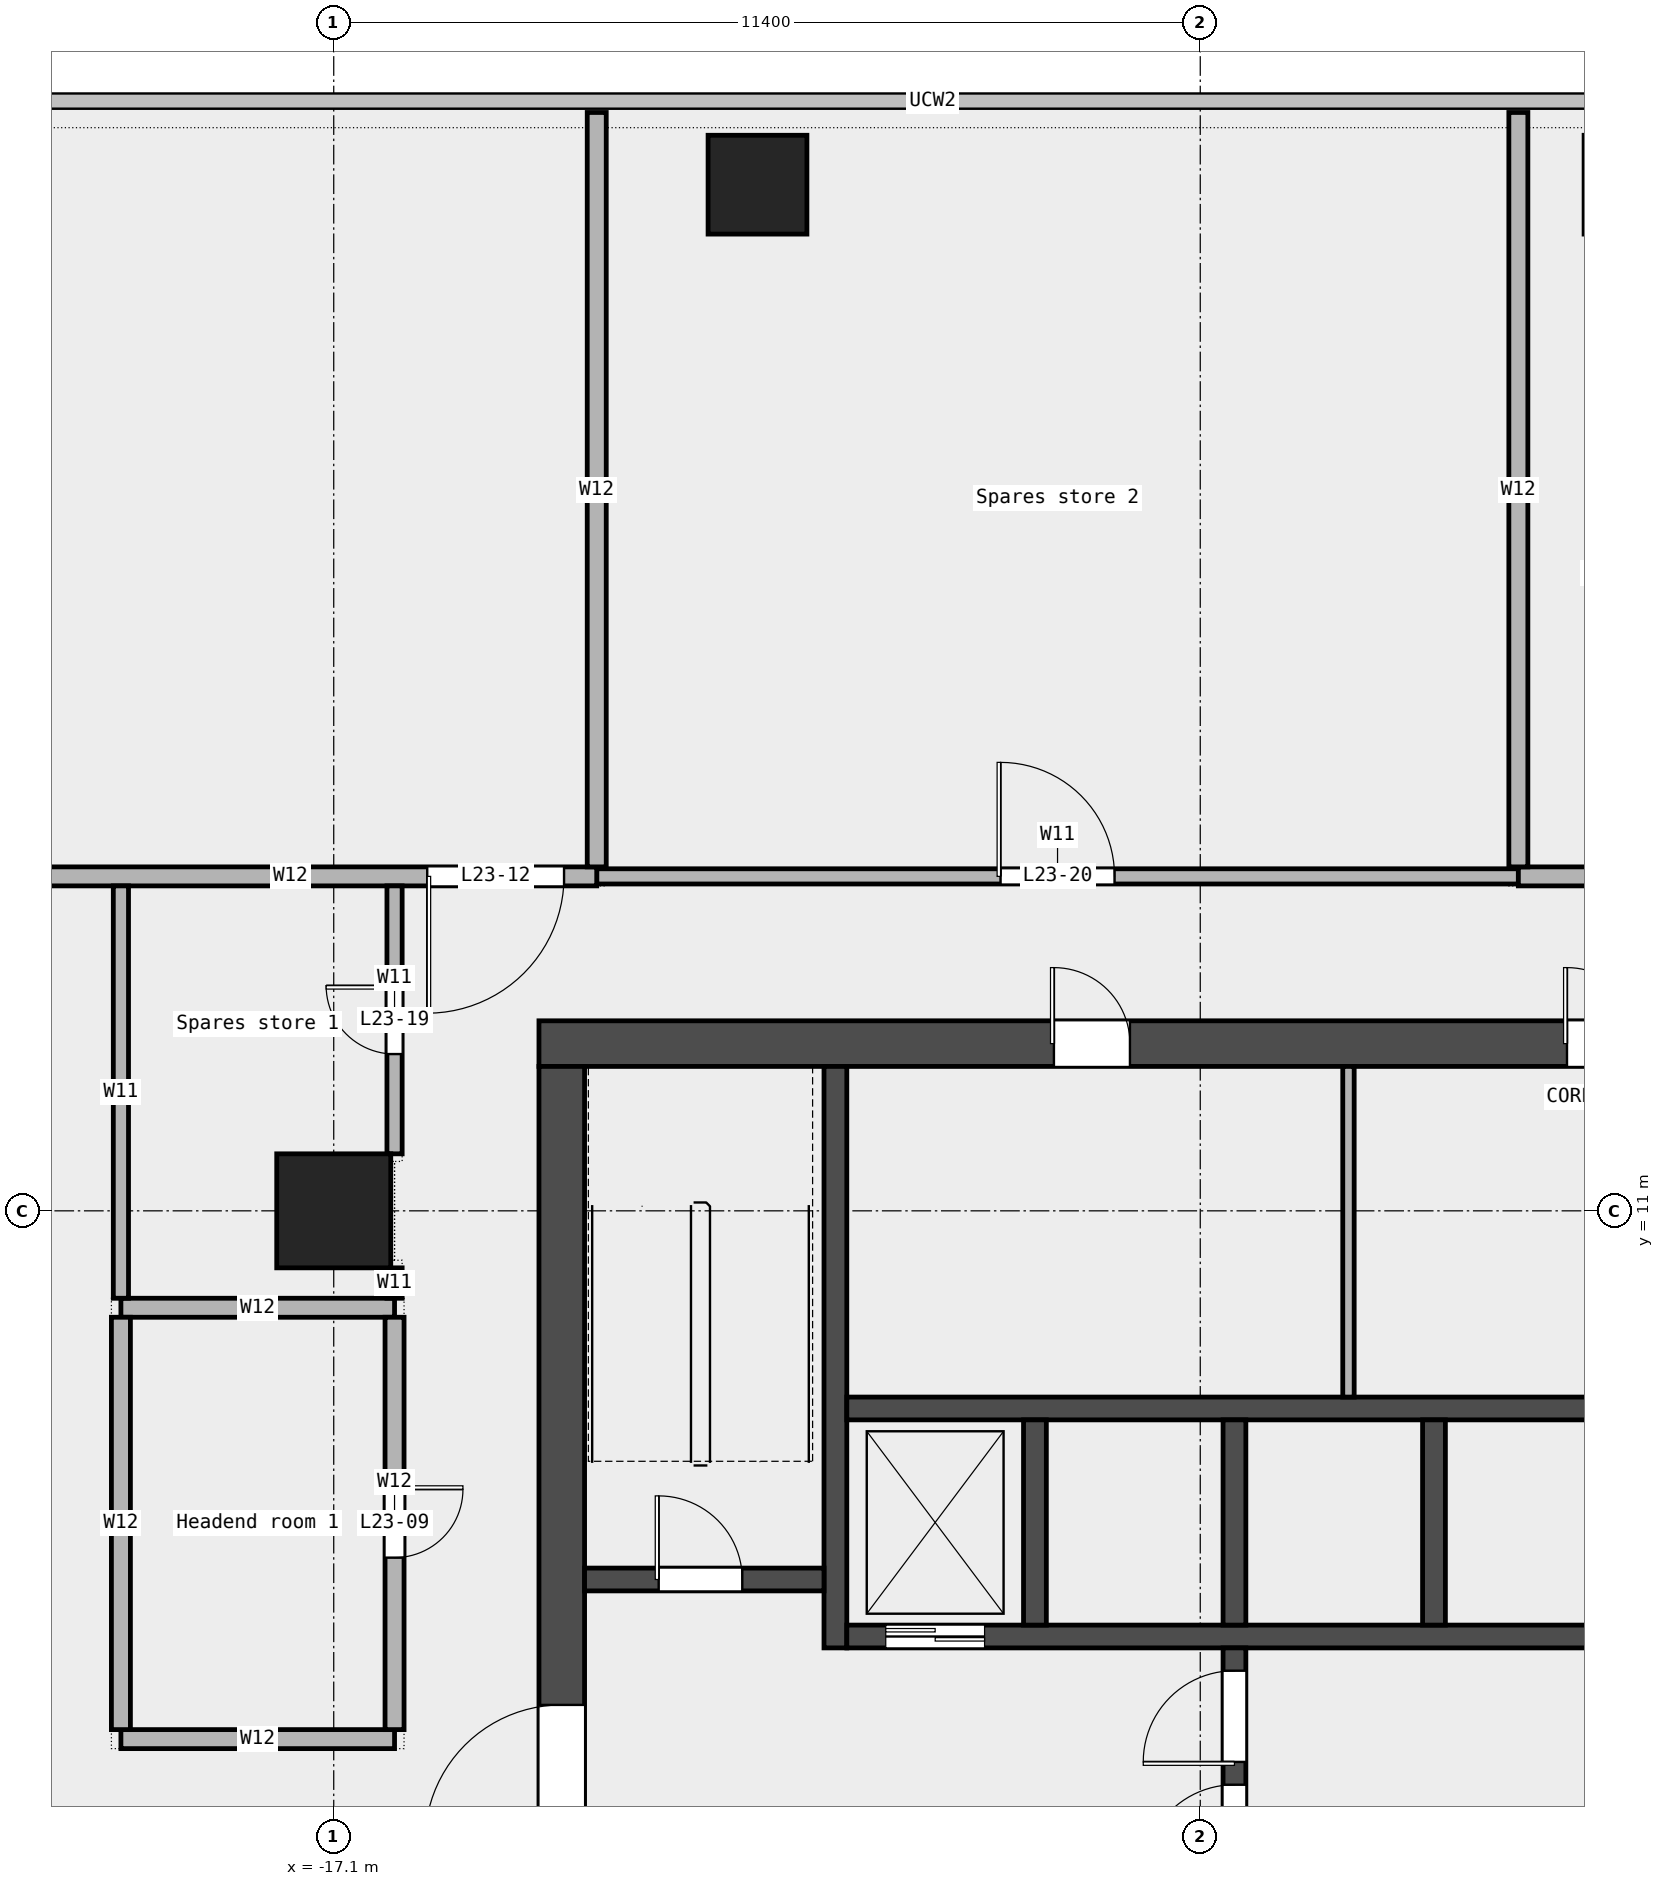
"""IFC4 building model, lengths in metres.
Left out: names, types, materials, properties, quantities, classifications, styles, units other than length and angle.
Written with IfcOpenShell. Run it as: python <this file> out.ifc"""

import sys

from ifc_helpers import new_model, si_unit, direction, frame, frame_2d, origin, origin_2d, place, context, subcontext, project, spatial, rectangle, extrude, element, fill, save


model = new_model("IFC4")
c1 = context("Model", 3, precision=1e-05, world=origin(), true_north=direction((0.0, 1.0)))
c2 = subcontext(c1, "Body", "Model", "MODEL_VIEW")
j1 = project(units=[si_unit("LENGTHUNIT", "METRE"), si_unit("PLANEANGLEUNIT", "RADIAN")], contexts=[c1])
p1 = place(None, origin())
s1 = spatial("IfcSite", under=j1, at=p1, CompositionType="ELEMENT")
p2 = place(p1, origin())
s2 = spatial("IfcBuilding", under=s1, at=p2, CompositionType="ELEMENT")
p3 = place(p2, frame((0.0, 0.0, 117.1)))
s3 = spatial("IfcBuildingStorey", under=s2, at=p3, CompositionType="ELEMENT", Elevation=117.1)
for number, where, z_axis, x_axis in (
    (1, (0.0, 24.5, 0.0), (0.0, 0.0, 1.0), (1.0, 0.0, 0.0)),
    (2, (-11.525, 24.5, 0.0), (0.0, 0.0, 1.0), (1.0, 0.0, 0.0)),
):
    element("IfcColumn", number, at=place(p3, frame(where, z_axis=z_axis, x_axis=x_axis)), inside=s3, PredefinedType="COLUMN", context=c2, shape_type="SweptSolid", body=[
        extrude(rectangle(XDim=1.3, YDim=1.3, at=origin_2d()), origin(), (0.0, 0.0, 1.0), 4.05),
    ])
p4 = place(p3, frame((-17.1, 11.0, 0.0), z_axis=(0.0, 0.0, 1.0), x_axis=(1.0, 0.0, 0.0)))
e3 = element("IfcColumn", 3, at=p4, inside=s3, PredefinedType="COLUMN", context=c2, shape_type="SweptSolid", body=[
    extrude(rectangle(XDim=1.5, YDim=1.5, at=origin_2d()), origin(), (0.0, 0.0, 1.0), 4.05),
])
for number, where, z_axis, x_axis in (
    (4, (-19.9, 4.05, 0.0), (0.0, 0.0, 1.0), (1.0, 0.0, 0.0)),
    (5, (-19.9, 9.725, 0.0), (0.0, 0.0, 1.0), (1.0, 0.0, 0.0)),
):
    element("IfcWall", number, at=place(p3, frame(where, z_axis=z_axis, x_axis=x_axis)), inside=s3, PredefinedType="PARTITIONING", context=c2, shape_type="SweptSolid", body=[
        extrude(rectangle(XDim=3.6, YDim=0.25, at=frame_2d((1.8, 0.0))), origin(), (0.0, 0.0, 1.0), 4.05),
    ])
p5 = place(p3, frame((-13.64, 15.4, 0.0), z_axis=(0.0, 0.0, 1.0), x_axis=(1.0, 0.0, 0.0)))
e6 = element("IfcWall", 6, at=p5, inside=s3, PredefinedType="PARTITIONING", context=c2, shape_type="SweptSolid", body=[
    extrude(rectangle(XDim=12.125, YDim=0.2, at=frame_2d((6.062, 0.0))), origin(), (0.0, 0.0, 1.0), 4.05),
])
p6 = place(p5, frame((5.312, 0.0, 0.0)))
e7 = element("IfcOpeningElement", 7, at=p6, cuts=e6, PredefinedType="OPENING", context=c2, shape_type="SweptSolid", body=[
    extrude(rectangle(XDim=1.5, YDim=2.1, at=frame_2d((0.75, 1.05))), frame((0.0, 0.112, 0.0), z_axis=(0.0, -1.0, 0.0), x_axis=(1.0, 0.0, 0.0)), (0.0, 0.0, 1.0), 0.224),
])
p7 = place(p3, frame((-21.7, 15.4, 0.0), z_axis=(0.0, 0.0, 1.0), x_axis=(1.0, 0.0, 0.0)))
e8 = element("IfcWall", 8, at=p7, inside=s3, PredefinedType="PARTITIONING", context=c2, shape_type="SweptSolid", body=[
    extrude(rectangle(XDim=8.06, YDim=0.25, at=frame_2d((4.03, 0.0))), origin(), (0.0, 0.0, 1.0), 4.05),
])
p8 = place(p7, frame((5.83, 0.0, 0.0)))
e9 = element("IfcOpeningElement", 9, at=p8, cuts=e8, PredefinedType="OPENING", context=c2, shape_type="SweptSolid", body=[
    extrude(rectangle(XDim=1.8, YDim=2.1, at=frame_2d((0.9, 1.05))), frame((0.0, 0.137, 0.0), z_axis=(0.0, -1.0, 0.0), x_axis=(1.0, 0.0, 0.0)), (0.0, 0.0, 1.0), 0.274),
])
p9 = place(p3, frame((-1.515, 15.4, 0.0), z_axis=(0.0, 0.0, 1.0), x_axis=(1.0, 0.0, 0.0)))
e10 = element("IfcWall", 10, at=p9, inside=s3, PredefinedType="PARTITIONING", context=c2, shape_type="SweptSolid", body=[
    extrude(rectangle(XDim=6.125, YDim=0.25, at=frame_2d((3.062, 0.0))), origin(), (0.0, 0.0, 1.0), 4.05),
])
p10 = place(p9, frame((2.462, 0.0, 0.0)))
e11 = element("IfcOpeningElement", 11, at=p10, cuts=e10, PredefinedType="OPENING", context=c2, shape_type="SweptSolid", body=[
    extrude(rectangle(XDim=1.2, YDim=2.1, at=frame_2d((0.6, 1.05))), frame((0.0, 0.137, 0.0), z_axis=(0.0, -1.0, 0.0), x_axis=(1.0, 0.0, 0.0)), (0.0, 0.0, 1.0), 0.274),
])
p11 = place(p3, frame((-19.9, 9.85, 0.0), z_axis=(0.0, 0.0, 1.0), x_axis=(0.0, 1.0, 0.0)))
e12 = element("IfcWall", 12, at=p11, inside=s3, PredefinedType="PARTITIONING", context=c2, shape_type="SweptSolid", body=[
    extrude(rectangle(XDim=5.425, YDim=0.2, at=frame_2d((2.712, 0.0))), origin(), (0.0, 0.0, 1.0), 4.05),
])
p12 = place(p3, frame((-19.9, 4.175, 0.0), z_axis=(0.0, 0.0, 1.0), x_axis=(0.0, 1.0, 0.0)))
e13 = element("IfcWall", 13, at=p12, inside=s3, PredefinedType="PARTITIONING", context=c2, shape_type="SweptSolid", body=[
    extrude(rectangle(XDim=5.425, YDim=0.25, at=frame_2d((2.712, 0.0))), origin(), (0.0, 0.0, 1.0), 4.05),
])
p13 = place(p3, frame((-16.3, 9.85, 0.0), z_axis=(0.0, 0.0, 1.0), x_axis=(0.0, 1.0, 0.0)))
e14 = element("IfcWall", 14, at=p13, inside=s3, PredefinedType="PARTITIONING", context=c2, shape_type="SweptSolid", body=[
    extrude(rectangle(XDim=0.4, YDim=0.2, at=frame_2d((0.2, 0.0))), origin(), (0.0, 0.0, 1.0), 4.05),
])
p14 = place(p3, frame((-16.3, 11.75, 0.0), z_axis=(0.0, 0.0, 1.0), x_axis=(0.0, 1.0, 0.0)))
e15 = element("IfcWall", 15, at=p14, inside=s3, PredefinedType="PARTITIONING", context=c2, shape_type="SweptSolid", body=[
    extrude(rectangle(XDim=3.525, YDim=0.2, at=frame_2d((1.762, 0.0))), origin(), (0.0, 0.0, 1.0), 4.05),
])
p15 = place(p14, frame((1.312, 0.0, 0.0)))
e16 = element("IfcOpeningElement", 16, at=p15, cuts=e15, PredefinedType="OPENING", context=c2, shape_type="SweptSolid", body=[
    extrude(rectangle(XDim=0.9, YDim=2.1, at=frame_2d((0.45, 1.05))), frame((0.0, 0.112, 0.0), z_axis=(0.0, -1.0, 0.0), x_axis=(1.0, 0.0, 0.0)), (0.0, 0.0, 1.0), 0.224),
])
p16 = place(p3, frame((-16.3, 4.175, 0.0), z_axis=(0.0, 0.0, 1.0), x_axis=(0.0, 1.0, 0.0)))
e17 = element("IfcWall", 17, at=p16, inside=s3, PredefinedType="PARTITIONING", context=c2, shape_type="SweptSolid", body=[
    extrude(rectangle(XDim=5.425, YDim=0.25, at=frame_2d((2.712, 0.0))), origin(), (0.0, 0.0, 1.0), 4.05),
])
p17 = place(p16, frame((2.262, 0.0, 0.0)))
e18 = element("IfcOpeningElement", 18, at=p17, cuts=e17, PredefinedType="OPENING", context=c2, shape_type="SweptSolid", body=[
    extrude(rectangle(XDim=0.9, YDim=2.1, at=frame_2d((0.45, 1.05))), frame((0.0, 0.137, 0.0), z_axis=(0.0, -1.0, 0.0), x_axis=(1.0, 0.0, 0.0)), (0.0, 0.0, 1.0), 0.274),
])
for number, where, z_axis, x_axis in (
    (19, (-13.64, 15.525, 0.0), (0.0, 0.0, 1.0), (0.0, 1.0, 0.0)),
    (20, (-1.515, 15.525, 0.0), (0.0, 0.0, 1.0), (0.0, 1.0, 0.0)),
):
    element("IfcWall", number, at=place(p3, frame(where, z_axis=z_axis, x_axis=x_axis)), inside=s3, PredefinedType="PARTITIONING", context=c2, shape_type="SweptSolid", body=[
        extrude(rectangle(XDim=9.925, YDim=0.25, at=frame_2d((4.962, 0.0))), origin(), (0.0, 0.0, 1.0), 4.05),
    ])
p18 = place(p3, frame((-14.4, 13.2, 0.0), z_axis=(0.0, 0.0, 1.0), x_axis=(1.0, 0.0, 0.0)))
e21 = element("IfcWall", 21, at=p18, inside=s3, PredefinedType="SHEAR", context=c2, shape_type="SweptSolid", body=[
    extrude(rectangle(XDim=28.8, YDim=0.6, at=frame_2d((14.4, 0.0))), origin(), (0.0, 0.0, 1.0), 4.2),
])
p19 = place(p18, frame((6.775, 0.0, 0.0)))
e22 = element("IfcOpeningElement", 22, at=p19, cuts=e21, PredefinedType="OPENING", context=c2, shape_type="SweptSolid", body=[
    extrude(rectangle(XDim=1.0, YDim=2.1, at=frame_2d((0.5, 1.05))), frame((0.0, 0.312, 0.0), z_axis=(0.0, -1.0, 0.0), x_axis=(1.0, 0.0, 0.0)), (0.0, 0.0, 1.0), 0.624),
])
p20 = place(p18, frame((13.525, 0.0, 0.0)))
e23 = element("IfcOpeningElement", 23, at=p20, cuts=e21, PredefinedType="OPENING", context=c2, shape_type="SweptSolid", body=[
    extrude(rectangle(XDim=1.0, YDim=2.1, at=frame_2d((0.5, 1.05))), frame((0.0, 0.312, 0.0), z_axis=(0.0, -1.0, 0.0), x_axis=(1.0, 0.0, 0.0)), (0.0, 0.0, 1.0), 0.624),
])
p21 = place(p18, frame((20.65, 0.0, 0.0)))
e24 = element("IfcOpeningElement", 24, at=p21, cuts=e21, PredefinedType="OPENING", context=c2, shape_type="SweptSolid", body=[
    extrude(rectangle(XDim=1.0, YDim=2.1, at=frame_2d((0.5, 1.05))), frame((0.0, 0.312, 0.0), z_axis=(0.0, -1.0, 0.0), x_axis=(1.0, 0.0, 0.0)), (0.0, 0.0, 1.0), 0.624),
])
p22 = place(p3, frame((-14.1, -6.6, 0.0), z_axis=(0.0, 0.0, 1.0), x_axis=(0.0, 1.0, 0.0)))
e25 = element("IfcWall", 25, at=p22, inside=s3, PredefinedType="SHEAR", context=c2, shape_type="SweptSolid", body=[
    extrude(rectangle(XDim=19.5, YDim=0.6, at=frame_2d((9.75, 0.0))), origin(), (0.0, 0.0, 1.0), 4.2),
])
p23 = place(p22, frame((9.3, 0.0, 0.0)))
e26 = element("IfcOpeningElement", 26, at=p23, cuts=e25, PredefinedType="OPENING", context=c2, shape_type="SweptSolid", body=[
    extrude(rectangle(XDim=1.8, YDim=2.1, at=frame_2d((0.9, 1.05))), frame((0.0, 0.312, 0.0), z_axis=(0.0, -1.0, 0.0), x_axis=(1.0, 0.0, 0.0)), (0.0, 0.0, 1.0), 0.624),
])
p24 = place(p3, frame((-10.5, 5.25, 0.0), z_axis=(0.0, 0.0, 1.0), x_axis=(0.0, 1.0, 0.0)))
e27 = element("IfcWall", 27, at=p24, inside=s3, PredefinedType="SHEAR", context=c2, shape_type="SweptSolid", body=[
    extrude(rectangle(XDim=7.65, YDim=0.3, at=frame_2d((3.825, 0.0))), origin(), (0.0, 0.0, 1.0), 4.2),
])
p25 = place(p3, frame((-13.8, 6.15, 0.0), z_axis=(0.0, 0.0, 1.0), x_axis=(1.0, 0.0, 0.0)))
e28 = element("IfcWall", 28, at=p25, inside=s3, PredefinedType="SOLIDWALL", context=c2, shape_type="SweptSolid", body=[
    extrude(rectangle(XDim=3.15, YDim=0.3, at=frame_2d((1.575, 0.0))), origin(), (0.0, 0.0, 1.0), 4.2),
])
p26 = place(p25, frame((0.975, 0.0, 0.0)))
e29 = element("IfcOpeningElement", 29, at=p26, cuts=e28, PredefinedType="OPENING", context=c2, shape_type="SweptSolid", body=[
    extrude(rectangle(XDim=1.1, YDim=2.1, at=frame_2d((0.55, 1.05))), frame((0.0, 0.162, 0.0), z_axis=(0.0, -1.0, 0.0), x_axis=(1.0, 0.0, 0.0)), (0.0, 0.0, 1.0), 0.324),
])
p27 = place(p3, frame((-10.35, 5.4, 0.0), z_axis=(0.0, 0.0, 1.0), x_axis=(1.0, 0.0, 0.0)))
e30 = element("IfcWall", 30, at=p27, inside=s3, PredefinedType="SOLIDWALL", context=c2, shape_type="SweptSolid", body=[
    extrude(rectangle(XDim=20.7, YDim=0.3, at=frame_2d((10.35, 0.0))), origin(), (0.0, 0.0, 1.0), 4.2),
])
p28 = place(p27, frame((0.512, 0.0, 0.0)))
e31 = element("IfcOpeningElement", 31, at=p28, cuts=e30, PredefinedType="OPENING", context=c2, shape_type="SweptSolid", body=[
    extrude(rectangle(XDim=1.3, YDim=2.1, at=frame_2d((0.65, 1.05))), frame((0.0, 0.162, 0.0), z_axis=(0.0, -1.0, 0.0), x_axis=(1.0, 0.0, 0.0)), (0.0, 0.0, 1.0), 0.324),
])
p29 = place(p3, frame((-10.35, 8.4, 0.0), z_axis=(0.0, 0.0, 1.0), x_axis=(1.0, 0.0, 0.0)))
e32 = element("IfcWall", 32, at=p29, inside=s3, PredefinedType="SOLIDWALL", context=c2, shape_type="SweptSolid", body=[
    extrude(rectangle(XDim=20.7, YDim=0.3, at=frame_2d((10.35, 0.0))), origin(), (0.0, 0.0, 1.0), 4.2),
])
for number, where, z_axis, x_axis in (
    (33, (-7.875, 5.55, 0.0), (0.0, 0.0, 1.0), (0.0, 1.0, 0.0)),
    (34, (-5.25, 5.55, 0.0), (0.0, 0.0, 1.0), (0.0, 1.0, 0.0)),
    (35, (-2.625, 5.55, 0.0), (0.0, 0.0, 1.0), (0.0, 1.0, 0.0)),
):
    element("IfcWall", number, at=place(p3, frame(where, z_axis=z_axis, x_axis=x_axis)), inside=s3, PredefinedType="SOLIDWALL", context=c2, shape_type="SweptSolid", body=[
        extrude(rectangle(XDim=2.7, YDim=0.3, at=frame_2d((1.35, 0.0))), origin(), (0.0, 0.0, 1.0), 4.2),
    ])
p30 = place(p3, frame((-5.25, 1.95, 0.0), z_axis=(0.0, 0.0, 1.0), x_axis=(0.0, 1.0, 0.0)))
e36 = element("IfcWall", 36, at=p30, inside=s3, PredefinedType="SOLIDWALL", context=c2, shape_type="SweptSolid", body=[
    extrude(rectangle(XDim=3.3, YDim=0.3, at=frame_2d((1.65, 0.0))), origin(), (0.0, 0.0, 1.0), 4.2),
])
p31 = place(p30, frame((0.3, 0.0, 0.0)))
e37 = element("IfcOpeningElement", 37, at=p31, cuts=e36, PredefinedType="OPENING", context=c2, shape_type="SweptSolid", body=[
    extrude(rectangle(XDim=1.2, YDim=2.1, at=frame_2d((0.6, 1.05))), frame((0.0, 0.162, 0.0), z_axis=(0.0, -1.0, 0.0), x_axis=(1.0, 0.0, 0.0)), (0.0, 0.0, 1.0), 0.324),
])
p32 = place(p30, frame((1.8, 0.0, 0.0)))
e38 = element("IfcOpeningElement", 38, at=p32, cuts=e36, PredefinedType="OPENING", context=c2, shape_type="SweptSolid", body=[
    extrude(rectangle(XDim=1.2, YDim=2.1, at=frame_2d((0.6, 1.05))), frame((0.0, 0.162, 0.0), z_axis=(0.0, -1.0, 0.0), x_axis=(1.0, 0.0, 0.0)), (0.0, 0.0, 1.0), 0.324),
])
p33 = place(p3, frame((-3.75, 8.55, 0.0), z_axis=(0.0, 0.0, 1.0), x_axis=(0.0, 1.0, 0.0)))
e39 = element("IfcWall", 39, at=p33, inside=s3, PredefinedType="PARTITIONING", context=c2, shape_type="SweptSolid", body=[
    extrude(rectangle(XDim=4.35, YDim=0.15, at=frame_2d((2.175, 0.0))), origin(), (0.0, 0.0, 1.0), 4.2),
])
p34 = place(p17, origin())
e40 = element("IfcDoor", 40, at=p34, inside=s3, OperationType="SINGLE_SWING_LEFT", PredefinedType="DOOR", context=c2, shape_type="SweptSolid", body=[
    extrude(rectangle(XDim=0.9, YDim=2.1, at=frame_2d((0.45, 1.05))), frame((0.0, 0.025, 0.0), z_axis=(0.0, -1.0, 0.0), x_axis=(1.0, 0.0, 0.0)), (0.0, 0.0, 1.0), 0.05),
])
fill(e18, e40)
p35 = place(p8, origin())
e41 = element("IfcDoor", 41, at=p35, inside=s3, OperationType="DOUBLE_DOOR_SINGLE_SWING", PredefinedType="DOOR", context=c2, shape_type="SweptSolid", body=[
    extrude(rectangle(XDim=1.8, YDim=2.1, at=frame_2d((0.9, 1.05))), frame((0.0, 0.025, 0.0), z_axis=(0.0, -1.0, 0.0), x_axis=(1.0, 0.0, 0.0)), (0.0, 0.0, 1.0), 0.05),
])
fill(e9, e41)
p36 = place(p15, origin())
e42 = element("IfcDoor", 42, at=p36, inside=s3, OperationType="SINGLE_SWING_RIGHT", PredefinedType="DOOR", context=c2, shape_type="SweptSolid", body=[
    extrude(rectangle(XDim=0.9, YDim=2.1, at=frame_2d((0.45, 1.05))), frame((0.0, 0.025, 0.0), z_axis=(0.0, -1.0, 0.0), x_axis=(1.0, 0.0, 0.0)), (0.0, 0.0, 1.0), 0.05),
])
fill(e16, e42)
p37 = place(p6, origin())
e43 = element("IfcDoor", 43, at=p37, inside=s3, OperationType="DOUBLE_DOOR_SINGLE_SWING", PredefinedType="DOOR", context=c2, shape_type="SweptSolid", body=[
    extrude(rectangle(XDim=1.5, YDim=2.1, at=frame_2d((0.75, 1.05))), frame((0.0, 0.025, 0.0), z_axis=(0.0, -1.0, 0.0), x_axis=(1.0, 0.0, 0.0)), (0.0, 0.0, 1.0), 0.05),
])
fill(e7, e43)
p38 = place(p26, origin())
e44 = element("IfcDoor", 44, at=p38, inside=s3, OperationType="SINGLE_SWING_LEFT", PredefinedType="DOOR", context=c2, shape_type="SweptSolid", body=[
    extrude(rectangle(XDim=1.1, YDim=2.1, at=frame_2d((0.55, 1.05))), frame((0.0, 0.025, 0.0), z_axis=(0.0, -1.0, 0.0), x_axis=(1.0, 0.0, 0.0)), (0.0, 0.0, 1.0), 0.05),
])
fill(e29, e44)
p39 = place(p23, origin())
e45 = element("IfcDoor", 45, at=p39, inside=s3, OperationType="DOUBLE_DOOR_SINGLE_SWING", PredefinedType="DOOR", context=c2, shape_type="SweptSolid", body=[
    extrude(rectangle(XDim=1.8, YDim=2.1, at=frame_2d((0.9, 1.05))), frame((0.0, 0.025, 0.0), z_axis=(0.0, -1.0, 0.0), x_axis=(1.0, 0.0, 0.0)), (0.0, 0.0, 1.0), 0.05),
])
fill(e26, e45)
p40 = place(p31, origin())
e46 = element("IfcDoor", 46, at=p40, inside=s3, OperationType="SINGLE_SWING_LEFT", PredefinedType="DOOR", context=c2, shape_type="SweptSolid", body=[
    extrude(rectangle(XDim=1.2, YDim=2.1, at=frame_2d((0.6, 1.05))), frame((0.0, 0.025, 0.0), z_axis=(0.0, -1.0, 0.0), x_axis=(1.0, 0.0, 0.0)), (0.0, 0.0, 1.0), 0.05),
])
fill(e37, e46)
p41 = place(p32, origin())
e47 = element("IfcDoor", 47, at=p41, inside=s3, OperationType="SINGLE_SWING_RIGHT", PredefinedType="DOOR", context=c2, shape_type="SweptSolid", body=[
    extrude(rectangle(XDim=1.2, YDim=2.1, at=frame_2d((0.6, 1.05))), frame((0.0, 0.025, 0.0), z_axis=(0.0, -1.0, 0.0), x_axis=(1.0, 0.0, 0.0)), (0.0, 0.0, 1.0), 0.05),
])
fill(e38, e47)
p42 = place(p28, origin())
e48 = element("IfcDoor", 48, at=p42, inside=s3, OperationType="DOUBLE_DOOR_SLIDING", PredefinedType="DOOR", context=c2, shape_type="SweptSolid", body=[
    extrude(rectangle(XDim=1.3, YDim=2.1, at=frame_2d((0.65, 1.05))), frame((0.0, 0.025, 0.0), z_axis=(0.0, -1.0, 0.0), x_axis=(1.0, 0.0, 0.0)), (0.0, 0.0, 1.0), 0.05),
])
fill(e31, e48)
p43 = place(p19, origin())
e49 = element("IfcDoor", 49, at=p43, inside=s3, OperationType="SINGLE_SWING_LEFT", PredefinedType="DOOR", context=c2, shape_type="SweptSolid", body=[
    extrude(rectangle(XDim=1.0, YDim=2.1, at=frame_2d((0.5, 1.05))), frame((0.0, 0.025, 0.0), z_axis=(0.0, -1.0, 0.0), x_axis=(1.0, 0.0, 0.0)), (0.0, 0.0, 1.0), 0.05),
])
fill(e22, e49)
p44 = place(p20, origin())
e50 = element("IfcDoor", 50, at=p44, inside=s3, OperationType="SINGLE_SWING_LEFT", PredefinedType="DOOR", context=c2, shape_type="SweptSolid", body=[
    extrude(rectangle(XDim=1.0, YDim=2.1, at=frame_2d((0.5, 1.05))), frame((0.0, 0.025, 0.0), z_axis=(0.0, -1.0, 0.0), x_axis=(1.0, 0.0, 0.0)), (0.0, 0.0, 1.0), 0.05),
])
fill(e23, e50)
save(model, sys.argv[1])
